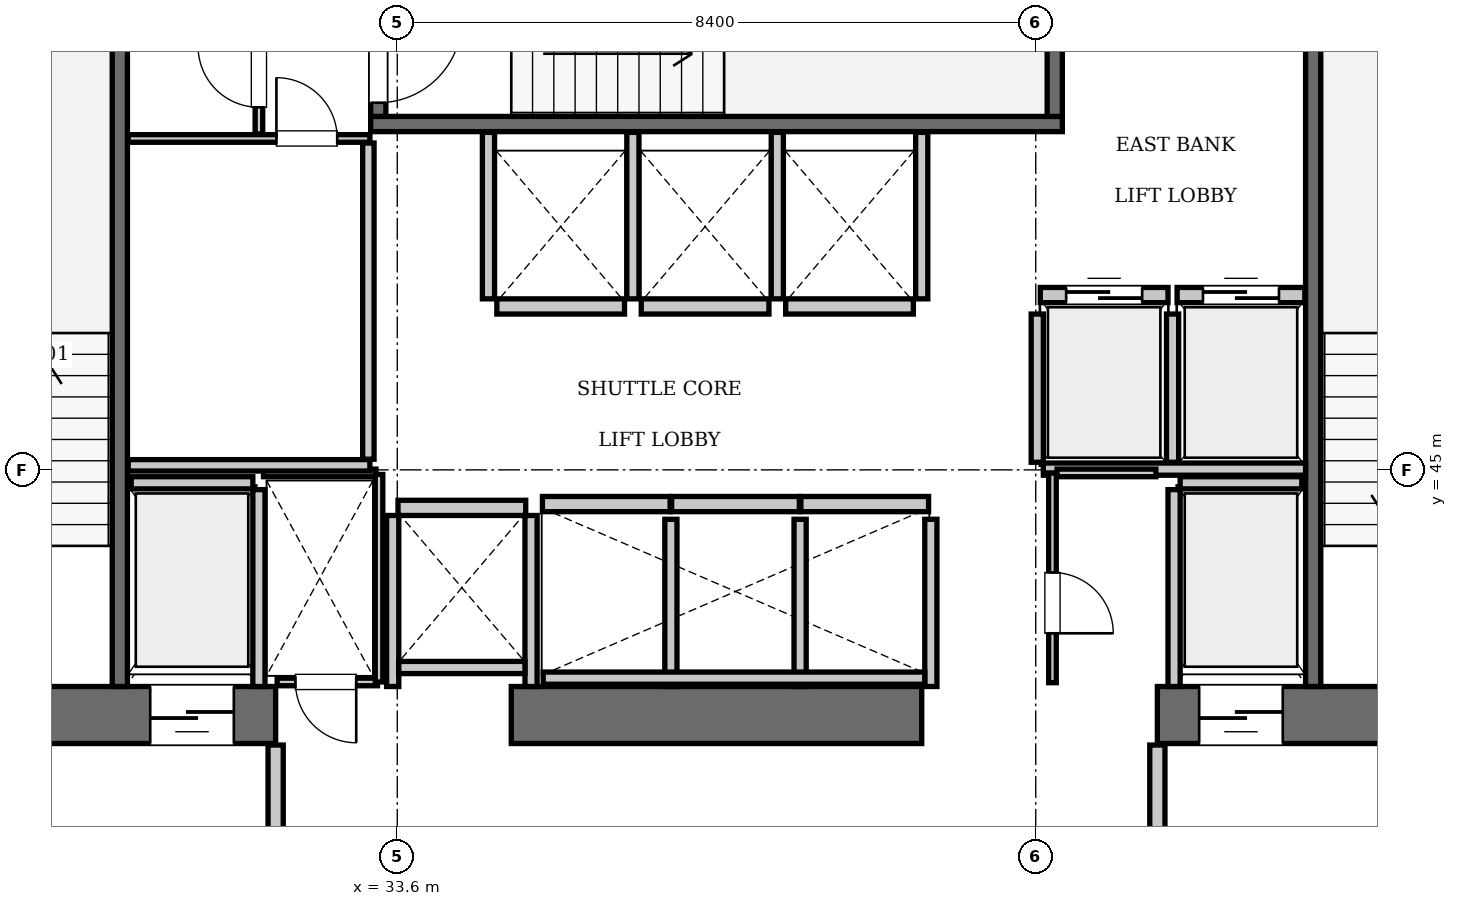
"""IFC4 building model, lengths in metres.
Left out: names, types, materials, properties, quantities, classifications, styles, units other than length and angle.
Written with IfcOpenShell. Run it as: python <this file> out.ifc"""

import sys

from ifc_helpers import new_model, si_unit, direction, frame, frame_2d, origin, place, context, subcontext, project, spatial, rectangle, extrude, element, fill, save


model = new_model("IFC4")
c1 = context("Model", 3, precision=1e-05, world=origin(), true_north=direction((0.0, 1.0)))
c2 = subcontext(c1, "Body", "Model", "MODEL_VIEW")
j1 = project(units=[si_unit("LENGTHUNIT", "METRE"), si_unit("PLANEANGLEUNIT", "RADIAN")], contexts=[c1])
p1 = place(None, origin())
s1 = spatial("IfcSite", under=j1, at=p1, CompositionType="ELEMENT")
p2 = place(p1, origin())
s2 = spatial("IfcBuilding", under=s1, at=p2, CompositionType="ELEMENT")
p3 = place(p2, frame((0.0, 0.0, 189.0)))
s3 = spatial("IfcBuildingStorey", under=s2, at=p3, CompositionType="ELEMENT", Elevation=189.0)
p4 = place(p3, frame((25.2, 41.775, 0.0), z_axis=(0.0, 0.0, 1.0), x_axis=(1.0, 0.0, 0.0)))
e1 = element("IfcWall", 1, at=p4, inside=s3, PredefinedType="SHEAR", context=c2, shape_type="SweptSolid", body=[
    extrude(rectangle(XDim=6.8, YDim=0.75, at=frame_2d((3.4, 0.0))), origin(), (0.0, 0.0, 1.0), 3.85),
])
p5 = place(p4, frame((1.65, 0.0, 0.0)))
e2 = element("IfcOpeningElement", 2, at=p5, cuts=e1, PredefinedType="OPENING", context=c2, shape_type="SweptSolid", body=[
    extrude(rectangle(XDim=1.15, YDim=2.15, at=frame_2d((0.575, 1.075))), frame((0.0, 0.385, 0.0), z_axis=(0.0, -1.0, 0.0), x_axis=(1.0, 0.0, 0.0)), (0.0, 0.0, 1.0), 0.77),
])
p6 = place(p4, frame((5.15, 0.0, 0.0)))
e3 = element("IfcOpeningElement", 3, at=p6, cuts=e1, PredefinedType="OPENING", context=c2, shape_type="SweptSolid", body=[
    extrude(rectangle(XDim=1.1, YDim=2.2, at=frame_2d((0.55, 1.1))), frame((0.0, 0.385, 0.0), z_axis=(0.0, -1.0, 0.0), x_axis=(1.0, 0.0, 0.0)), (0.0, 0.0, 1.0), 0.77),
])
p7 = place(p3, frame((35.1, 41.775, 0.0), z_axis=(0.0, 0.0, 1.0), x_axis=(1.0, 0.0, 0.0)))
e4 = element("IfcWall", 4, at=p7, inside=s3, PredefinedType="SHEAR", context=c2, shape_type="SweptSolid", body=[
    extrude(rectangle(XDim=5.4, YDim=0.75, at=frame_2d((2.7, 0.0))), origin(), (0.0, 0.0, 1.0), 3.85),
])
p8 = place(p3, frame((43.6, 41.775, 0.0), z_axis=(0.0, 0.0, 1.0), x_axis=(1.0, 0.0, 0.0)))
e5 = element("IfcWall", 5, at=p8, inside=s3, PredefinedType="SHEAR", context=c2, shape_type="SweptSolid", body=[
    extrude(rectangle(XDim=6.8, YDim=0.75, at=frame_2d((3.4, 0.0))), origin(), (0.0, 0.0, 1.0), 3.85),
])
p9 = place(p8, frame((3.9, 0.0, 0.0)))
e6 = element("IfcOpeningElement", 6, at=p9, cuts=e5, PredefinedType="OPENING", context=c2, shape_type="SweptSolid", body=[
    extrude(rectangle(XDim=1.15, YDim=2.15, at=frame_2d((0.575, 1.075))), frame((0.0, 0.385, 0.0), z_axis=(0.0, -1.0, 0.0), x_axis=(1.0, 0.0, 0.0)), (0.0, 0.0, 1.0), 0.77),
])
p10 = place(p8, frame((0.55, 0.0, 0.0)))
e7 = element("IfcOpeningElement", 7, at=p10, cuts=e5, PredefinedType="OPENING", context=c2, shape_type="SweptSolid", body=[
    extrude(rectangle(XDim=1.1, YDim=2.2, at=frame_2d((0.55, 1.1))), frame((0.0, 0.385, 0.0), z_axis=(0.0, -1.0, 0.0), x_axis=(1.0, 0.0, 0.0)), (0.0, 0.0, 1.0), 0.77),
])
p11 = place(p3, frame((29.95, 42.15, 0.0), z_axis=(0.0, 0.0, 1.0), x_axis=(0.0, 1.0, 0.0)))
e8 = element("IfcWall", 8, at=p11, inside=s3, PredefinedType="SOLIDWALL", context=c2, shape_type="SweptSolid", body=[
    extrude(rectangle(XDim=9.0, YDim=0.2, at=frame_2d((4.5, 0.0))), origin(), (0.0, 0.0, 1.0), 3.61),
])
p12 = place(p3, frame((33.25, 49.55, 0.0), z_axis=(0.0, 0.0, 1.0), x_axis=(1.0, 0.0, 0.0)))
e9 = element("IfcWall", 9, at=p12, inside=s3, PredefinedType="SOLIDWALL", context=c2, shape_type="SweptSolid", body=[
    extrude(rectangle(XDim=9.1, YDim=0.2, at=frame_2d((4.55, 0.0))), origin(), (0.0, 0.0, 1.0), 3.61),
])
p13 = place(p3, frame((42.25, 49.65, 0.0), z_axis=(0.0, 0.0, 1.0), x_axis=(0.0, 1.0, 0.0)))
e10 = element("IfcWall", 10, at=p13, inside=s3, PredefinedType="SOLIDWALL", context=c2, shape_type="SweptSolid", body=[
    extrude(rectangle(XDim=3.6, YDim=0.2, at=frame_2d((1.8, 0.0))), origin(), (0.0, 0.0, 1.0), 3.61),
])
p14 = place(p3, frame((33.35, 49.65, 0.0), z_axis=(0.0, 0.0, 1.0), x_axis=(0.0, 1.0, 0.0)))
e11 = element("IfcWall", 11, at=p14, inside=s3, PredefinedType="SOLIDWALL", context=c2, shape_type="SweptSolid", body=[
    extrude(rectangle(XDim=3.6, YDim=0.2, at=frame_2d((1.8, 0.0))), origin(), (0.0, 0.0, 1.0), 3.61),
])
p15 = place(p14, frame((0.18, 0.0, 0.0)))
e12 = element("IfcOpeningElement", 12, at=p15, cuts=e11, PredefinedType="OPENING", context=c2, shape_type="SweptSolid", body=[
    extrude(rectangle(XDim=1.1, YDim=2.15, at=frame_2d((0.55, 1.075))), frame((0.0, 0.11, 0.0), z_axis=(0.0, -1.0, 0.0), x_axis=(1.0, 0.0, 0.0)), (0.0, 0.0, 1.0), 0.22),
])
p16 = place(p3, frame((45.65, 42.15, 0.0), z_axis=(0.0, 0.0, 1.0), x_axis=(0.0, 1.0, 0.0)))
e13 = element("IfcWall", 13, at=p16, inside=s3, PredefinedType="SOLIDWALL", context=c2, shape_type="SweptSolid", body=[
    extrude(rectangle(XDim=9.0, YDim=0.2, at=frame_2d((4.5, 0.0))), origin(), (0.0, 0.0, 1.0), 3.61),
])
p17 = place(p3, frame((42.06, 47.3, 0.0), z_axis=(0.0, 0.0, 1.0), x_axis=(1.0, 0.0, 0.0)))
e14 = element("IfcWall", 14, at=p17, inside=s3, PredefinedType="SOLIDWALL", context=c2, shape_type="SweptSolid", body=[
    extrude(rectangle(XDim=1.68, YDim=0.2, at=frame_2d((0.84, 0.0))), origin(), (0.0, 0.0, 1.0), 3.61),
])
p18 = place(p17, frame((0.34, 0.0, 0.0)))
e15 = element("IfcOpeningElement", 15, at=p18, cuts=e14, PredefinedType="OPENING", context=c2, shape_type="SweptSolid", body=[
    extrude(rectangle(XDim=1.0, YDim=2.15, at=frame_2d((0.5, 1.075))), frame((0.0, 0.11, 0.0), z_axis=(0.0, -1.0, 0.0), x_axis=(1.0, 0.0, 0.0)), (0.0, 0.0, 1.0), 0.22),
])
p19 = place(p3, frame((43.86, 47.3, 0.0), z_axis=(0.0, 0.0, 1.0), x_axis=(1.0, 0.0, 0.0)))
e16 = element("IfcWall", 16, at=p19, inside=s3, PredefinedType="SOLIDWALL", context=c2, shape_type="SweptSolid", body=[
    extrude(rectangle(XDim=1.68, YDim=0.2, at=frame_2d((0.84, 0.0))), origin(), (0.0, 0.0, 1.0), 3.61),
])
p20 = place(p19, frame((0.34, 0.0, 0.0)))
e17 = element("IfcOpeningElement", 17, at=p20, cuts=e16, PredefinedType="OPENING", context=c2, shape_type="SweptSolid", body=[
    extrude(rectangle(XDim=1.0, YDim=2.15, at=frame_2d((0.5, 1.075))), frame((0.0, 0.11, 0.0), z_axis=(0.0, -1.0, 0.0), x_axis=(1.0, 0.0, 0.0)), (0.0, 0.0, 1.0), 0.22),
])
for number, where, z_axis, x_axis in (
    (18, (35.51, 44.55, 0.0), (0.0, 0.0, 1.0), (1.0, 0.0, 0.0)),
    (19, (37.21, 44.55, 0.0), (0.0, 0.0, 1.0), (1.0, 0.0, 0.0)),
):
    element("IfcWall", number, at=place(p3, frame(where, z_axis=z_axis, x_axis=x_axis)), inside=s3, PredefinedType="SOLIDWALL", context=c2, shape_type="SweptSolid", body=[
        extrude(rectangle(XDim=1.68, YDim=0.2, at=frame_2d((0.84, 0.0))), origin(), (0.0, 0.0, 1.0), 3.61),
    ])
for number, where, z_axis, x_axis in (
    (20, (38.91, 44.55, 0.0), (0.0, 0.0, 1.0), (1.0, 0.0, 0.0)),
    (21, (34.91, 47.15, 0.0), (0.0, 0.0, 1.0), (1.0, 0.0, 0.0)),
):
    element("IfcWall", number, at=place(p3, frame(where, z_axis=z_axis, x_axis=x_axis)), inside=s3, PredefinedType="SOLIDWALL", context=c2, shape_type="SweptSolid", body=[
        extrude(rectangle(XDim=1.68, YDim=0.2, at=frame_2d((0.84, 0.0))), origin(), (0.0, 0.0, 1.0), 3.61),
    ])
for number, where, z_axis, x_axis in (
    (22, (36.81, 47.15, 0.0), (0.0, 0.0, 1.0), (1.0, 0.0, 0.0)),
    (23, (38.71, 47.15, 0.0), (0.0, 0.0, 1.0), (1.0, 0.0, 0.0)),
    (24, (33.61, 44.5, 0.0), (0.0, 0.0, 1.0), (1.0, 0.0, 0.0)),
):
    element("IfcWall", number, at=place(p3, frame(where, z_axis=z_axis, x_axis=x_axis)), inside=s3, PredefinedType="SOLIDWALL", context=c2, shape_type="SweptSolid", body=[
        extrude(rectangle(XDim=1.68, YDim=0.2, at=frame_2d((0.84, 0.0))), origin(), (0.0, 0.0, 1.0), 3.61),
    ])
p21 = place(p3, frame((30.1, 44.83, 0.0), z_axis=(0.0, 0.0, 1.0), x_axis=(1.0, 0.0, 0.0)))
e25 = element("IfcWall", 25, at=p21, inside=s3, PredefinedType="SOLIDWALL", context=c2, shape_type="SweptSolid", body=[
    extrude(rectangle(XDim=1.6, YDim=0.16, at=frame_2d((0.8, 0.0))), origin(), (0.0, 0.0, 1.0), 3.61),
])
p22 = place(p3, frame((31.78, 42.15, 0.0), z_axis=(0.0, 0.0, 1.0), x_axis=(0.0, 1.0, 0.0)))
e26 = element("IfcWall", 26, at=p22, inside=s3, PredefinedType="SOLIDWALL", context=c2, shape_type="SweptSolid", body=[
    extrude(rectangle(XDim=2.59, YDim=0.16, at=frame_2d((1.295, 0.0))), origin(), (0.0, 0.0, 1.0), 3.61),
])
p23 = place(p3, frame((43.9, 44.83, 0.0), z_axis=(0.0, 0.0, 1.0), x_axis=(1.0, 0.0, 0.0)))
e27 = element("IfcWall", 27, at=p23, inside=s3, PredefinedType="SOLIDWALL", context=c2, shape_type="SweptSolid", body=[
    extrude(rectangle(XDim=1.6, YDim=0.16, at=frame_2d((0.8, 0.0))), origin(), (0.0, 0.0, 1.0), 3.61),
])
p24 = place(p3, frame((43.82, 42.15, 0.0), z_axis=(0.0, 0.0, 1.0), x_axis=(0.0, 1.0, 0.0)))
e28 = element("IfcWall", 28, at=p24, inside=s3, PredefinedType="SOLIDWALL", context=c2, shape_type="SweptSolid", body=[
    extrude(rectangle(XDim=2.59, YDim=0.16, at=frame_2d((1.295, 0.0))), origin(), (0.0, 0.0, 1.0), 3.61),
])
for number, where, z_axis, x_axis in (
    (29, (42.02, 45.1, 0.0), (0.0, 0.0, 1.0), (0.0, 1.0, 0.0)),
    (30, (43.8, 45.1, 0.0), (0.0, 0.0, 1.0), (0.0, 1.0, 0.0)),
):
    element("IfcWall", number, at=place(p3, frame(where, z_axis=z_axis, x_axis=x_axis)), inside=s3, PredefinedType="SOLIDWALL", context=c2, shape_type="SweptSolid", body=[
        extrude(rectangle(XDim=1.95, YDim=0.16, at=frame_2d((0.975, 0.0))), origin(), (0.0, 0.0, 1.0), 3.61),
    ])
p25 = place(p3, frame((42.1, 45.01, 0.0), z_axis=(0.0, 0.0, 1.0), x_axis=(1.0, 0.0, 0.0)))
e31 = element("IfcWall", 31, at=p25, inside=s3, PredefinedType="SOLIDWALL", context=c2, shape_type="SweptSolid", body=[
    extrude(rectangle(XDim=3.45, YDim=0.16, at=frame_2d((1.725, 0.0))), origin(), (0.0, 0.0, 1.0), 3.61),
])
for number, where, z_axis, x_axis in (
    (32, (37.2, 42.15, 0.0), (0.0, 0.0, 1.0), (0.0, 1.0, 0.0)),
    (33, (38.9, 42.15, 0.0), (0.0, 0.0, 1.0), (0.0, 1.0, 0.0)),
    (34, (40.62, 42.15, 0.0), (0.0, 0.0, 1.0), (0.0, 1.0, 0.0)),
):
    element("IfcWall", number, at=place(p3, frame(where, z_axis=z_axis, x_axis=x_axis)), inside=s3, PredefinedType="SOLIDWALL", context=c2, shape_type="SweptSolid", body=[
        extrude(rectangle(XDim=2.2, YDim=0.16, at=frame_2d((1.1, 0.0))), origin(), (0.0, 0.0, 1.0), 3.61),
    ])
p26 = place(p3, frame((35.52, 42.26, 0.0), z_axis=(0.0, 0.0, 1.0), x_axis=(1.0, 0.0, 0.0)))
e35 = element("IfcWall", 35, at=p26, inside=s3, PredefinedType="SOLIDWALL", context=c2, shape_type="SweptSolid", body=[
    extrude(rectangle(XDim=5.02, YDim=0.16, at=frame_2d((2.51, 0.0))), origin(), (0.0, 0.0, 1.0), 3.61),
])
for number, where, z_axis, x_axis in (
    (36, (34.8, 47.25, 0.0), (0.0, 0.0, 1.0), (0.0, 1.0, 0.0)),
    (37, (36.7, 47.25, 0.0), (0.0, 0.0, 1.0), (0.0, 1.0, 0.0)),
    (38, (38.6, 47.25, 0.0), (0.0, 0.0, 1.0), (0.0, 1.0, 0.0)),
    (39, (40.5, 47.25, 0.0), (0.0, 0.0, 1.0), (0.0, 1.0, 0.0)),
):
    element("IfcWall", number, at=place(p3, frame(where, z_axis=z_axis, x_axis=x_axis)), inside=s3, PredefinedType="SOLIDWALL", context=c2, shape_type="SweptSolid", body=[
        extrude(rectangle(XDim=2.19, YDim=0.16, at=frame_2d((1.095, 0.0))), origin(), (0.0, 0.0, 1.0), 3.61),
    ])
for number, where, z_axis, x_axis in (
    (40, (33.54, 42.15, 0.0), (0.0, 0.0, 1.0), (0.0, 1.0, 0.0)),
    (41, (35.36, 42.15, 0.0), (0.0, 0.0, 1.0), (0.0, 1.0, 0.0)),
):
    element("IfcWall", number, at=place(p3, frame(where, z_axis=z_axis, x_axis=x_axis)), inside=s3, PredefinedType="SOLIDWALL", context=c2, shape_type="SweptSolid", body=[
        extrude(rectangle(XDim=2.25, YDim=0.16, at=frame_2d((1.125, 0.0))), origin(), (0.0, 0.0, 1.0), 3.61),
    ])
p27 = place(p3, frame((33.62, 42.4, 0.0), z_axis=(0.0, 0.0, 1.0), x_axis=(1.0, 0.0, 0.0)))
e42 = element("IfcWall", 42, at=p27, inside=s3, PredefinedType="SOLIDWALL", context=c2, shape_type="SweptSolid", body=[
    extrude(rectangle(XDim=1.66, YDim=0.16, at=frame_2d((0.83, 0.0))), origin(), (0.0, 0.0, 1.0), 3.61),
])
for number, where, z_axis, x_axis in (
    (43, (32.0, 38.31, 0.0), (0.0, 0.0, 1.0), (0.0, 1.0, 0.0)),
    (44, (43.6, 38.31, 0.0), (0.0, 0.0, 1.0), (0.0, 1.0, 0.0)),
):
    element("IfcWall", number, at=place(p3, frame(where, z_axis=z_axis, x_axis=x_axis)), inside=s3, PredefinedType="PARTITIONING", context=c2, shape_type="SweptSolid", body=[
        extrude(rectangle(XDim=3.07, YDim=0.2, at=frame_2d((1.535, 0.0))), origin(), (0.0, 0.0, 1.0), 3.61),
    ])
p28 = place(p3, frame((32.02, 42.21, 0.0), z_axis=(0.0, 0.0, 1.0), x_axis=(1.0, 0.0, 0.0)))
e45 = element("IfcWall", 45, at=p28, inside=s3, PredefinedType="PARTITIONING", context=c2, shape_type="SweptSolid", body=[
    extrude(rectangle(XDim=1.32, YDim=0.1, at=frame_2d((0.66, 0.0))), origin(), (0.0, 0.0, 1.0), 3.61),
])
p29 = place(p28, frame((0.24, 0.0, 0.0)))
e46 = element("IfcOpeningElement", 46, at=p29, cuts=e45, PredefinedType="OPENING", context=c2, shape_type="SweptSolid", body=[
    extrude(rectangle(XDim=0.8, YDim=2.05, at=frame_2d((0.4, 1.025))), frame((0.0, 0.06, 0.0), z_axis=(0.0, -1.0, 0.0), x_axis=(1.0, 0.0, 0.0)), (0.0, 0.0, 1.0), 0.12),
])
p30 = place(p3, frame((31.84, 44.96, 0.0), z_axis=(0.0, 0.0, 1.0), x_axis=(1.0, 0.0, 0.0)))
e47 = element("IfcWall", 47, at=p30, inside=s3, PredefinedType="PARTITIONING", context=c2, shape_type="SweptSolid", body=[
    extrude(rectangle(XDim=1.48, YDim=0.1, at=frame_2d((0.74, 0.0))), origin(), (0.0, 0.0, 1.0), 3.61),
])
p31 = place(p3, frame((33.36, 42.21, 0.0), z_axis=(0.0, 0.0, 1.0), x_axis=(0.0, 1.0, 0.0)))
e48 = element("IfcWall", 48, at=p31, inside=s3, PredefinedType="PARTITIONING", context=c2, shape_type="SweptSolid", body=[
    extrude(rectangle(XDim=2.73, YDim=0.1, at=frame_2d((1.365, 0.0))), origin(), (0.0, 0.0, 1.0), 3.61),
])
p32 = place(p3, frame((42.22, 42.2, 0.0), z_axis=(0.0, 0.0, 1.0), x_axis=(0.0, 1.0, 0.0)))
e49 = element("IfcWall", 49, at=p32, inside=s3, PredefinedType="PARTITIONING", context=c2, shape_type="SweptSolid", body=[
    extrude(rectangle(XDim=2.76, YDim=0.1, at=frame_2d((1.38, 0.0))), origin(), (0.0, 0.0, 1.0), 3.61),
])
p33 = place(p32, frame((0.65, 0.0, 0.0)))
e50 = element("IfcOpeningElement", 50, at=p33, cuts=e49, PredefinedType="OPENING", context=c2, shape_type="SweptSolid", body=[
    extrude(rectangle(XDim=0.8, YDim=2.05, at=frame_2d((0.4, 1.025))), frame((0.0, 0.06, 0.0), z_axis=(0.0, -1.0, 0.0), x_axis=(1.0, 0.0, 0.0)), (0.0, 0.0, 1.0), 0.12),
])
p34 = place(p3, frame((42.28, 44.96, 0.0), z_axis=(0.0, 0.0, 1.0), x_axis=(1.0, 0.0, 0.0)))
e51 = element("IfcWall", 51, at=p34, inside=s3, PredefinedType="PARTITIONING", context=c2, shape_type="SweptSolid", body=[
    extrude(rectangle(XDim=1.3, YDim=0.1, at=frame_2d((0.65, 0.0))), origin(), (0.0, 0.0, 1.0), 3.61),
])
p35 = place(p3, frame((30.06, 45.06, 0.0), z_axis=(0.0, 0.0, 1.0), x_axis=(1.0, 0.0, 0.0)))
e52 = element("IfcWall", 52, at=p35, inside=s3, PredefinedType="PARTITIONING", context=c2, shape_type="SweptSolid", body=[
    extrude(rectangle(XDim=3.18, YDim=0.15, at=frame_2d((1.59, 0.0))), origin(), (0.0, 0.0, 1.0), 3.61),
])
p36 = place(p3, frame((33.22, 45.14, 0.0), z_axis=(0.0, 0.0, 1.0), x_axis=(0.0, 1.0, 0.0)))
e53 = element("IfcWall", 53, at=p36, inside=s3, PredefinedType="PARTITIONING", context=c2, shape_type="SweptSolid", body=[
    extrude(rectangle(XDim=4.16, YDim=0.15, at=frame_2d((2.08, 0.0))), origin(), (0.0, 0.0, 1.0), 3.61),
])
p37 = place(p3, frame((30.06, 49.36, 0.0), z_axis=(0.0, 0.0, 1.0), x_axis=(1.0, 0.0, 0.0)))
e54 = element("IfcWall", 54, at=p37, inside=s3, PredefinedType="PARTITIONING", context=c2, shape_type="SweptSolid", body=[
    extrude(rectangle(XDim=3.18, YDim=0.1, at=frame_2d((1.59, 0.0))), origin(), (0.0, 0.0, 1.0), 3.61),
])
p38 = place(p37, frame((1.95, 0.0, 0.0)))
e55 = element("IfcOpeningElement", 55, at=p38, cuts=e54, PredefinedType="OPENING", context=c2, shape_type="SweptSolid", body=[
    extrude(rectangle(XDim=0.8, YDim=2.05, at=frame_2d((0.4, 1.025))), frame((0.0, 0.06, 0.0), z_axis=(0.0, -1.0, 0.0), x_axis=(1.0, 0.0, 0.0)), (0.0, 0.0, 1.0), 0.12),
])
p39 = place(p3, frame((31.78, 49.42, 0.0), z_axis=(0.0, 0.0, 1.0), x_axis=(0.0, 1.0, 0.0)))
e56 = element("IfcWall", 56, at=p39, inside=s3, PredefinedType="PARTITIONING", context=c2, shape_type="SweptSolid", body=[
    extrude(rectangle(XDim=1.68, YDim=0.1, at=frame_2d((0.84, 0.0))), origin(), (0.0, 0.0, 1.0), 3.61),
])
p40 = place(p39, frame((0.35, 0.0, 0.0)))
e57 = element("IfcOpeningElement", 57, at=p40, cuts=e56, PredefinedType="OPENING", context=c2, shape_type="SweptSolid", body=[
    extrude(rectangle(XDim=0.8, YDim=2.05, at=frame_2d((0.4, 1.025))), frame((0.0, 0.06, 0.0), z_axis=(0.0, -1.0, 0.0), x_axis=(1.0, 0.0, 0.0)), (0.0, 0.0, 1.0), 0.12),
])
p41 = place(p15, frame((1.1, 0.0, 0.0), z_axis=(0.0, 0.0, 1.0), x_axis=(-1.0, 0.0, 0.0)))
e58 = element("IfcDoor", 58, at=p41, inside=s3, OperationType="SINGLE_SWING_LEFT", PredefinedType="DOOR", context=c2, shape_type="SweptSolid", body=[
    extrude(rectangle(XDim=1.1, YDim=2.15, at=frame_2d((0.55, 1.075))), frame((0.0, 0.025, 0.0), z_axis=(0.0, -1.0, 0.0), x_axis=(1.0, 0.0, 0.0)), (0.0, 0.0, 1.0), 0.05),
])
fill(e12, e58)
p42 = place(p18, origin())
e59 = element("IfcDoor", 59, at=p42, inside=s3, OperationType="SLIDING_TO_LEFT", PredefinedType="DOOR", context=c2, shape_type="SweptSolid", body=[
    extrude(rectangle(XDim=1.0, YDim=2.15, at=frame_2d((0.5, 1.075))), frame((0.0, 0.025, 0.0), z_axis=(0.0, -1.0, 0.0), x_axis=(1.0, 0.0, 0.0)), (0.0, 0.0, 1.0), 0.05),
])
fill(e15, e59)
p43 = place(p20, origin())
e60 = element("IfcDoor", 60, at=p43, inside=s3, OperationType="SLIDING_TO_LEFT", PredefinedType="DOOR", context=c2, shape_type="SweptSolid", body=[
    extrude(rectangle(XDim=1.0, YDim=2.15, at=frame_2d((0.5, 1.075))), frame((0.0, 0.025, 0.0), z_axis=(0.0, -1.0, 0.0), x_axis=(1.0, 0.0, 0.0)), (0.0, 0.0, 1.0), 0.05),
])
fill(e17, e60)
p44 = place(p6, frame((1.1, 0.0, 0.0), z_axis=(0.0, 0.0, 1.0), x_axis=(-1.0, 0.0, 0.0)))
e61 = element("IfcDoor", 61, at=p44, inside=s3, OperationType="SLIDING_TO_LEFT", PredefinedType="DOOR", context=c2, shape_type="SweptSolid", body=[
    extrude(rectangle(XDim=1.1, YDim=2.2, at=frame_2d((0.55, 1.1))), frame((0.0, 0.025, 0.0), z_axis=(0.0, -1.0, 0.0), x_axis=(1.0, 0.0, 0.0)), (0.0, 0.0, 1.0), 0.05),
])
fill(e3, e61)
p45 = place(p10, frame((1.1, 0.0, 0.0), z_axis=(0.0, 0.0, 1.0), x_axis=(-1.0, 0.0, 0.0)))
e62 = element("IfcDoor", 62, at=p45, inside=s3, OperationType="SLIDING_TO_LEFT", PredefinedType="DOOR", context=c2, shape_type="SweptSolid", body=[
    extrude(rectangle(XDim=1.1, YDim=2.2, at=frame_2d((0.55, 1.1))), frame((0.0, 0.025, 0.0), z_axis=(0.0, -1.0, 0.0), x_axis=(1.0, 0.0, 0.0)), (0.0, 0.0, 1.0), 0.05),
])
fill(e7, e62)
p46 = place(p29, frame((0.8, 0.0, 0.0), z_axis=(0.0, 0.0, 1.0), x_axis=(-1.0, 0.0, 0.0)))
e63 = element("IfcDoor", 63, at=p46, inside=s3, OperationType="SINGLE_SWING_LEFT", PredefinedType="DOOR", context=c2, shape_type="SweptSolid", body=[
    extrude(rectangle(XDim=0.8, YDim=2.05, at=frame_2d((0.4, 1.025))), frame((0.0, 0.025, 0.0), z_axis=(0.0, -1.0, 0.0), x_axis=(1.0, 0.0, 0.0)), (0.0, 0.0, 1.0), 0.05),
])
fill(e46, e63)
p47 = place(p33, frame((0.8, 0.0, 0.0), z_axis=(0.0, 0.0, 1.0), x_axis=(-1.0, 0.0, 0.0)))
e64 = element("IfcDoor", 64, at=p47, inside=s3, OperationType="SINGLE_SWING_RIGHT", PredefinedType="DOOR", context=c2, shape_type="SweptSolid", body=[
    extrude(rectangle(XDim=0.8, YDim=2.05, at=frame_2d((0.4, 1.025))), frame((0.0, 0.025, 0.0), z_axis=(0.0, -1.0, 0.0), x_axis=(1.0, 0.0, 0.0)), (0.0, 0.0, 1.0), 0.05),
])
fill(e50, e64)
p48 = place(p38, origin())
e65 = element("IfcDoor", 65, at=p48, inside=s3, OperationType="SINGLE_SWING_LEFT", PredefinedType="DOOR", context=c2, shape_type="SweptSolid", body=[
    extrude(rectangle(XDim=0.8, YDim=2.05, at=frame_2d((0.4, 1.025))), frame((0.0, 0.025, 0.0), z_axis=(0.0, -1.0, 0.0), x_axis=(1.0, 0.0, 0.0)), (0.0, 0.0, 1.0), 0.05),
])
fill(e55, e65)
p49 = place(p40, origin())
e66 = element("IfcDoor", 66, at=p49, inside=s3, OperationType="SINGLE_SWING_RIGHT", PredefinedType="DOOR", context=c2, shape_type="SweptSolid", body=[
    extrude(rectangle(XDim=0.8, YDim=2.05, at=frame_2d((0.4, 1.025))), frame((0.0, 0.025, 0.0), z_axis=(0.0, -1.0, 0.0), x_axis=(1.0, 0.0, 0.0)), (0.0, 0.0, 1.0), 0.05),
])
fill(e57, e66)
save(model, sys.argv[1])
